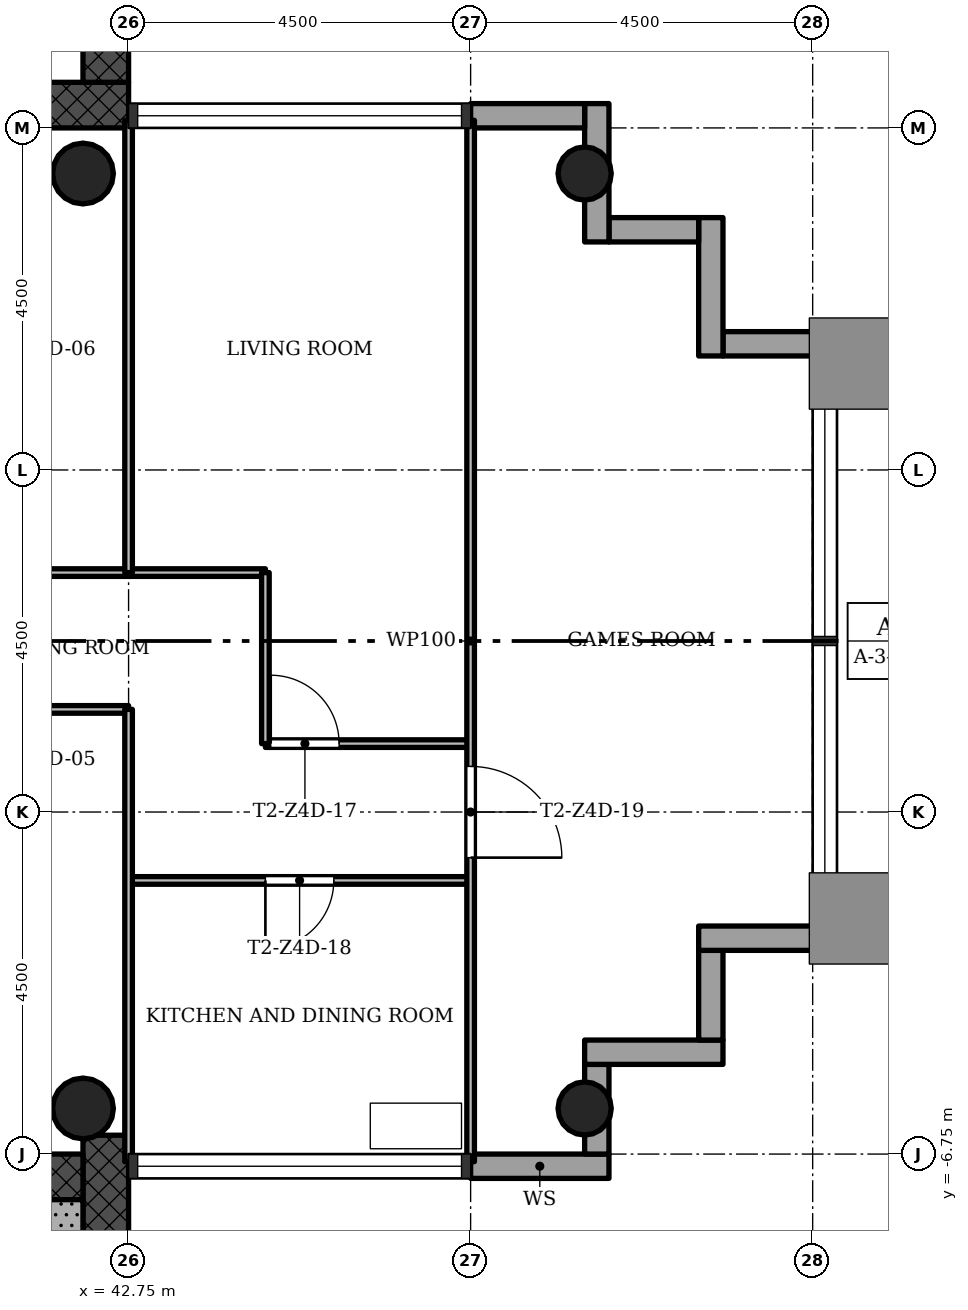
"""IFC4 building model, lengths in metres.
Left out: names, types, materials, properties, quantities, classifications, styles, units other than length and angle.
Written with IfcOpenShell. Run it as: python <this file> out.ifc"""

import sys

from ifc_helpers import new_model, si_unit, direction, frame, frame_2d, origin, origin_2d, place, context, subcontext, project, spatial, rectangle, hollow_circle, extrude, element, fill, save


model = new_model("IFC4")
c1 = context("Model", 3, precision=1e-05, world=origin(), true_north=direction((0.0, 1.0)))
c2 = subcontext(c1, "Body", "Model", "MODEL_VIEW")
j1 = project(units=[si_unit("LENGTHUNIT", "METRE"), si_unit("PLANEANGLEUNIT", "RADIAN")], contexts=[c1])
p1 = place(None, origin())
s1 = spatial("IfcSite", under=j1, at=p1, CompositionType="ELEMENT")
p2 = place(p1, origin())
s2 = spatial("IfcBuilding", under=s1, at=p2, CompositionType="ELEMENT")
p3 = place(p2, frame((0.0, 0.0, 196.0)))
s3 = spatial("IfcBuildingStorey", under=s2, at=p3, CompositionType="ELEMENT", Elevation=196.0)
p4 = place(p3, frame((29.85, 7.05, 0.0), z_axis=(0.0, 0.0, 1.0), x_axis=(1.0, 0.0, 0.0)))
e1 = element("IfcWall", 1, at=p4, inside=s3, PredefinedType="SHEAR", context=c2, shape_type="SweptSolid", body=[
    extrude(rectangle(XDim=12.9, YDim=0.6, at=frame_2d((6.45, 0.0))), origin(), (0.0, 0.0, 1.0), 3.4),
])
p5 = place(p4, frame((5.25, 0.0, 0.0)))
e2 = element("IfcOpeningElement", 2, at=p5, cuts=e1, PredefinedType="OPENING", context=c2, shape_type="SweptSolid", body=[
    extrude(rectangle(XDim=1.8, YDim=2.1, at=frame_2d((0.9, 1.05))), frame((0.0, 0.31, 0.0), z_axis=(0.0, -1.0, 0.0), x_axis=(1.0, 0.0, 0.0)), (0.0, 0.0, 1.0), 0.62),
])
p6 = place(p3, frame((42.45, 7.35, 0.0), z_axis=(0.0, 0.0, 1.0), x_axis=(0.0, 1.0, 0.0)))
e3 = element("IfcWall", 3, at=p6, inside=s3, PredefinedType="SHEAR", context=c2, shape_type="SweptSolid", body=[
    extrude(rectangle(XDim=8.4, YDim=0.6, at=frame_2d((4.2, 0.0))), origin(), (0.0, 0.0, 1.0), 3.4),
])
p7 = place(p3, frame((42.45, -15.15, 0.0), z_axis=(0.0, 0.0, 1.0), x_axis=(0.0, 1.0, 0.0)))
e4 = element("IfcWall", 4, at=p7, inside=s3, PredefinedType="SHEAR", context=c2, shape_type="SweptSolid", body=[
    extrude(rectangle(XDim=8.648, YDim=0.6, at=frame_2d((4.324, 0.0))), origin(), (0.0, 0.0, 1.0), 3.4),
])
p8 = place(p3, frame((42.15, -7.05, 0.0), z_axis=(0.0, 0.0, 1.0), x_axis=(-1.0, 0.0, 0.0)))
e5 = element("IfcWall", 5, at=p8, inside=s3, PredefinedType="SHEAR", context=c2, shape_type="SweptSolid", body=[
    extrude(rectangle(XDim=12.9, YDim=0.6, at=frame_2d((6.45, 0.0))), origin(), (0.0, 0.0, 1.0), 3.4),
])
p9 = place(p8, frame((5.25, 0.0, 0.0)))
e6 = element("IfcOpeningElement", 6, at=p9, cuts=e5, PredefinedType="OPENING", context=c2, shape_type="SweptSolid", body=[
    extrude(rectangle(XDim=1.8, YDim=2.1, at=frame_2d((0.9, 1.05))), frame((0.0, 0.31, 0.0), z_axis=(0.0, -1.0, 0.0), x_axis=(1.0, 0.0, 0.0)), (0.0, 0.0, 1.0), 0.62),
])
for number, where, z_axis, x_axis in (
    (7, (48.75, -6.15, 0.0), (0.0, 0.0, 1.0), (1.0, 0.0, 0.0)),
    (8, (48.75, 6.15, 0.0), (0.0, 0.0, 1.0), (1.0, 0.0, 0.0)),
):
    element("IfcColumn", number, at=place(p3, frame(where, z_axis=z_axis, x_axis=x_axis)), inside=s3, PredefinedType="COLUMN", context=c2, shape_type="SweptSolid", body=[
        extrude(hollow_circle(Radius=0.35, WallThickness=0.025, at=origin_2d()), origin(), (0.0, 0.0, 1.0), 3.4),
    ])
for number, where, z_axis, x_axis in (
    (9, (42.15, -6.15, 0.0), (0.0, 0.0, 1.0), (1.0, 0.0, 0.0)),
    (10, (42.15, 6.15, 0.0), (0.0, 0.0, 1.0), (1.0, 0.0, 0.0)),
):
    element("IfcColumn", number, at=place(p3, frame(where, z_axis=z_axis, x_axis=x_axis)), inside=s3, PredefinedType="COLUMN", context=c2, shape_type="SweptSolid", body=[
        extrude(hollow_circle(Radius=0.4, WallThickness=0.028, at=origin_2d()), origin(), (0.0, 0.0, 1.0), 3.4),
    ])
p10 = place(p3, frame((47.25, -6.91, -0.3), z_axis=(0.0, 0.0, 1.0), x_axis=(1.0, 0.0, 0.0)))
e11 = element("IfcWall", 11, at=p10, inside=s3, PredefinedType="STANDARD", context=c2, shape_type="SweptSolid", body=[
    extrude(rectangle(XDim=1.82, YDim=0.32, at=frame_2d((0.91, 0.0))), origin(), (0.0, 0.0, 1.0), 3.4),
])
p11 = place(p3, frame((48.91, -6.75, -0.3), z_axis=(0.0, 0.0, 1.0), x_axis=(0.0, 1.0, 0.0)))
e12 = element("IfcWall", 12, at=p11, inside=s3, PredefinedType="STANDARD", context=c2, shape_type="SweptSolid", body=[
    extrude(rectangle(XDim=1.18, YDim=0.32, at=frame_2d((0.59, 0.0))), origin(), (0.0, 0.0, 1.0), 3.4),
])
p12 = place(p3, frame((48.75, -5.41, -0.3), z_axis=(0.0, 0.0, 1.0), x_axis=(1.0, 0.0, 0.0)))
e13 = element("IfcWall", 13, at=p12, inside=s3, PredefinedType="STANDARD", context=c2, shape_type="SweptSolid", body=[
    extrude(rectangle(XDim=1.82, YDim=0.32, at=frame_2d((0.91, 0.0))), origin(), (0.0, 0.0, 1.0), 3.4),
])
p13 = place(p3, frame((50.41, -5.25, -0.3), z_axis=(0.0, 0.0, 1.0), x_axis=(0.0, 1.0, 0.0)))
e14 = element("IfcWall", 14, at=p13, inside=s3, PredefinedType="STANDARD", context=c2, shape_type="SweptSolid", body=[
    extrude(rectangle(XDim=1.18, YDim=0.32, at=frame_2d((0.59, 0.0))), origin(), (0.0, 0.0, 1.0), 3.4),
])
p14 = place(p3, frame((50.25, -3.91, -0.3), z_axis=(0.0, 0.0, 1.0), x_axis=(1.0, 0.0, 0.0)))
e15 = element("IfcWall", 15, at=p14, inside=s3, PredefinedType="STANDARD", context=c2, shape_type="SweptSolid", body=[
    extrude(rectangle(XDim=1.82, YDim=0.32, at=frame_2d((0.91, 0.0))), origin(), (0.0, 0.0, 1.0), 3.4),
])
p15 = place(p3, frame((52.07, 3.91, -0.3), z_axis=(0.0, 0.0, 1.0), x_axis=(-1.0, 0.0, 0.0)))
e16 = element("IfcWall", 16, at=p15, inside=s3, PredefinedType="STANDARD", context=c2, shape_type="SweptSolid", body=[
    extrude(rectangle(XDim=1.5, YDim=0.32, at=frame_2d((0.75, 0.0))), origin(), (0.0, 0.0, 1.0), 3.4),
])
p16 = place(p3, frame((50.41, 3.75, -0.3), z_axis=(0.0, 0.0, 1.0), x_axis=(0.0, 1.0, 0.0)))
e17 = element("IfcWall", 17, at=p16, inside=s3, PredefinedType="STANDARD", context=c2, shape_type="SweptSolid", body=[
    extrude(rectangle(XDim=1.82, YDim=0.32, at=frame_2d((0.91, 0.0))), origin(), (0.0, 0.0, 1.0), 3.4),
])
p17 = place(p3, frame((50.25, 5.41, -0.3), z_axis=(0.0, 0.0, 1.0), x_axis=(-1.0, 0.0, 0.0)))
e18 = element("IfcWall", 18, at=p17, inside=s3, PredefinedType="STANDARD", context=c2, shape_type="SweptSolid", body=[
    extrude(rectangle(XDim=1.18, YDim=0.32, at=frame_2d((0.59, 0.0))), origin(), (0.0, 0.0, 1.0), 3.4),
])
p18 = place(p3, frame((48.91, 5.25, -0.3), z_axis=(0.0, 0.0, 1.0), x_axis=(0.0, 1.0, 0.0)))
e19 = element("IfcWall", 19, at=p18, inside=s3, PredefinedType="STANDARD", context=c2, shape_type="SweptSolid", body=[
    extrude(rectangle(XDim=1.82, YDim=0.32, at=frame_2d((0.91, 0.0))), origin(), (0.0, 0.0, 1.0), 3.4),
])
p19 = place(p3, frame((48.75, 6.91, -0.3), z_axis=(0.0, 0.0, 1.0), x_axis=(-1.0, 0.0, 0.0)))
e20 = element("IfcWall", 20, at=p19, inside=s3, PredefinedType="STANDARD", context=c2, shape_type="SweptSolid", body=[
    extrude(rectangle(XDim=1.5, YDim=0.32, at=frame_2d((0.75, 0.0))), origin(), (0.0, 0.0, 1.0), 3.4),
])
p20 = place(p3, frame((47.25, -3.15, 0.0), z_axis=(0.0, 0.0, 1.0), x_axis=(-1.0, 0.0, 0.0)))
e21 = element("IfcWall", 21, at=p20, inside=s3, PredefinedType="PARTITIONING", context=c2, shape_type="SweptSolid", body=[
    extrude(rectangle(XDim=4.5, YDim=0.1, at=frame_2d((2.25, 0.0))), origin(), (0.0, 0.0, 1.0), 3.0),
])
p21 = place(p20, frame((1.8, 0.0, 0.0)))
e22 = element("IfcOpeningElement", 22, at=p21, cuts=e21, PredefinedType="OPENING", context=c2, shape_type="SweptSolid", body=[
    extrude(rectangle(XDim=0.9, YDim=2.1, at=frame_2d((0.45, 1.05))), frame((0.0, 0.06, 0.0), z_axis=(0.0, -1.0, 0.0), x_axis=(1.0, 0.0, 0.0)), (0.0, 0.0, 1.0), 0.12),
])
p22 = place(p3, frame((47.25, -1.35, 0.0), z_axis=(0.0, 0.0, 1.0), x_axis=(-1.0, 0.0, 0.0)))
e23 = element("IfcWall", 23, at=p22, inside=s3, PredefinedType="PARTITIONING", context=c2, shape_type="SweptSolid", body=[
    extrude(rectangle(XDim=2.7, YDim=0.1, at=frame_2d((1.35, 0.0))), origin(), (0.0, 0.0, 1.0), 3.0),
])
p23 = place(p22, frame((1.73, 0.0, 0.0)))
e24 = element("IfcOpeningElement", 24, at=p23, cuts=e23, PredefinedType="OPENING", context=c2, shape_type="SweptSolid", body=[
    extrude(rectangle(XDim=0.9, YDim=2.1, at=frame_2d((0.45, 1.05))), frame((0.0, 0.06, 0.0), z_axis=(0.0, -1.0, 0.0), x_axis=(1.0, 0.0, 0.0)), (0.0, 0.0, 1.0), 0.12),
])
p24 = place(p3, frame((42.75, -0.9, 0.0), z_axis=(0.0, 0.0, 1.0), x_axis=(-1.0, 0.0, 0.0)))
e25 = element("IfcWall", 25, at=p24, inside=s3, PredefinedType="PARTITIONING", context=c2, shape_type="SweptSolid", body=[
    extrude(rectangle(XDim=2.25, YDim=0.1, at=frame_2d((1.125, 0.0))), origin(), (0.0, 0.0, 1.0), 3.0),
])
p25 = place(p3, frame((44.55, 0.9, 0.0), z_axis=(0.0, 0.0, 1.0), x_axis=(-1.0, 0.0, 0.0)))
e26 = element("IfcWall", 26, at=p25, inside=s3, PredefinedType="PARTITIONING", context=c2, shape_type="SweptSolid", body=[
    extrude(rectangle(XDim=4.05, YDim=0.1, at=frame_2d((2.025, 0.0))), origin(), (0.0, 0.0, 1.0), 3.0),
])
p26 = place(p3, frame((47.25, -6.85, 0.0), z_axis=(0.0, 0.0, 1.0), x_axis=(0.0, 1.0, 0.0)))
e27 = element("IfcWall", 27, at=p26, inside=s3, PredefinedType="PARTITIONING", context=c2, shape_type="SweptSolid", body=[
    extrude(rectangle(XDim=13.7, YDim=0.1, at=frame_2d((6.85, 0.0))), origin(), (0.0, 0.0, 1.0), 3.0),
])
p27 = place(p26, frame((4.0, 0.0, 0.0)))
e28 = element("IfcOpeningElement", 28, at=p27, cuts=e27, PredefinedType="OPENING", context=c2, shape_type="SweptSolid", body=[
    extrude(rectangle(XDim=1.2, YDim=2.1, at=frame_2d((0.6, 1.05))), frame((0.0, 0.06, 0.0), z_axis=(0.0, -1.0, 0.0), x_axis=(1.0, 0.0, 0.0)), (0.0, 0.0, 1.0), 0.12),
])
p28 = place(p3, frame((44.55, -1.35, 0.0), z_axis=(0.0, 0.0, 1.0), x_axis=(0.0, 1.0, 0.0)))
e29 = element("IfcWall", 29, at=p28, inside=s3, PredefinedType="PARTITIONING", context=c2, shape_type="SweptSolid", body=[
    extrude(rectangle(XDim=2.25, YDim=0.1, at=frame_2d((1.125, 0.0))), origin(), (0.0, 0.0, 1.0), 3.0),
])
for number, where, z_axis, x_axis in (
    (30, (42.75, -6.85, 0.0), (0.0, 0.0, 1.0), (0.0, 1.0, 0.0)),
    (31, (42.75, 0.9, 0.0), (0.0, 0.0, 1.0), (0.0, 1.0, 0.0)),
):
    element("IfcWall", number, at=place(p3, frame(where, z_axis=z_axis, x_axis=x_axis)), inside=s3, PredefinedType="PARTITIONING", context=c2, shape_type="SweptSolid", body=[
        extrude(rectangle(XDim=5.95, YDim=0.1, at=frame_2d((2.975, 0.0))), origin(), (0.0, 0.0, 1.0), 3.0),
    ])
p29 = place(p3, frame((37.85, -7.65, 0.0), z_axis=(0.0, 0.0, 1.0), x_axis=(1.0, 0.0, 0.0)))
e32 = element("IfcWall", 32, at=p29, inside=s3, PredefinedType="SHEAR", context=c2, shape_type="SweptSolid", body=[
    extrude(rectangle(XDim=4.3, YDim=0.6, at=frame_2d((2.15, 0.0))), origin(), (0.0, 0.0, 1.0), 3.4),
])
p30 = place(p23, origin())
e33 = element("IfcDoor", 33, at=p30, inside=s3, OperationType="SINGLE_SWING_RIGHT", PredefinedType="DOOR", context=c2, shape_type="SweptSolid", body=[
    extrude(rectangle(XDim=0.9, YDim=2.1, at=frame_2d((0.45, 1.05))), frame((0.0, 0.025, 0.0), z_axis=(0.0, -1.0, 0.0), x_axis=(1.0, 0.0, 0.0)), (0.0, 0.0, 1.0), 0.05),
])
fill(e24, e33)
p31 = place(p21, origin())
e34 = element("IfcDoor", 34, at=p31, inside=s3, OperationType="SINGLE_SWING_LEFT", PredefinedType="DOOR", context=c2, shape_type="SweptSolid", body=[
    extrude(rectangle(XDim=0.9, YDim=2.1, at=frame_2d((0.45, 1.05))), frame((0.0, 0.025, 0.0), z_axis=(0.0, -1.0, 0.0), x_axis=(1.0, 0.0, 0.0)), (0.0, 0.0, 1.0), 0.05),
])
fill(e22, e34)
p32 = place(p27, origin())
e35 = element("IfcDoor", 35, at=p32, inside=s3, OperationType="SINGLE_SWING_LEFT", PredefinedType="DOOR", context=c2, shape_type="SweptSolid", body=[
    extrude(rectangle(XDim=1.2, YDim=2.1, at=frame_2d((0.6, 1.05))), frame((0.0, 0.025, 0.0), z_axis=(0.0, -1.0, 0.0), x_axis=(1.0, 0.0, 0.0)), (0.0, 0.0, 1.0), 0.05),
])
fill(e28, e35)
save(model, sys.argv[1])
